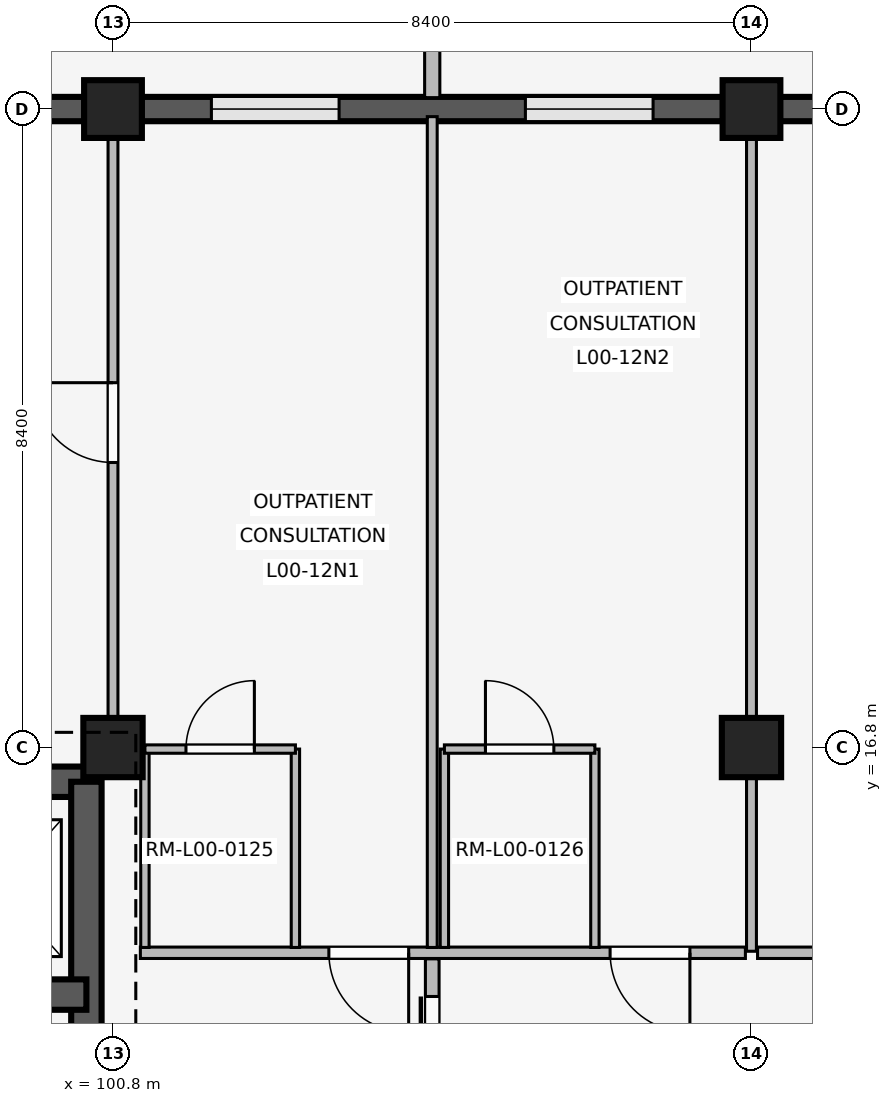
"""IFC4 building model, lengths in metres.
Left out: names, types, materials, properties, quantities, classifications, styles, units other than length and angle.
Written with IfcOpenShell. Run it as: python <this file> out.ifc"""

import sys

from ifc_helpers import new_model, si_unit, direction, frame, frame_2d, origin, origin_2d, place, context, subcontext, project, spatial, rectangle, extrude, element, fill, save


model = new_model("IFC4")
c1 = context("Model", 3, precision=1e-05, world=origin(), true_north=direction((0.0, 1.0)))
c2 = subcontext(c1, "Body", "Model", "MODEL_VIEW")
j1 = project(units=[si_unit("LENGTHUNIT", "METRE"), si_unit("PLANEANGLEUNIT", "RADIAN")], contexts=[c1])
p1 = place(None, origin())
s1 = spatial("IfcSite", under=j1, at=p1, CompositionType="ELEMENT")
p2 = place(p1, origin())
s2 = spatial("IfcBuilding", under=s1, at=p2, CompositionType="ELEMENT")
p3 = place(p2, origin())
s3 = spatial("IfcBuildingStorey", under=s2, at=p3, CompositionType="ELEMENT", Elevation=0.0)
p4 = place(p3, frame((100.8, 16.8, 0.0), z_axis=(0.0, 0.0, 1.0), x_axis=(1.0, 0.0, 0.0)))
e1 = element("IfcColumn", 1, at=p4, inside=s3, PredefinedType="COLUMN", context=c2, shape_type="SweptSolid", body=[
    extrude(rectangle(XDim=0.78, YDim=0.78, at=origin_2d()), origin(), (0.0, 0.0, 1.0), 4.8),
])
p5 = place(p3, frame((100.8, 25.2, 0.0), z_axis=(0.0, 0.0, 1.0), x_axis=(1.0, 0.0, 0.0)))
e2 = element("IfcColumn", 2, at=p5, inside=s3, PredefinedType="COLUMN", context=c2, shape_type="SweptSolid", body=[
    extrude(rectangle(XDim=0.76, YDim=0.76, at=origin_2d()), origin(), (0.0, 0.0, 1.0), 4.8),
])
p6 = place(p3, frame((109.2, 16.8, 0.0), z_axis=(0.0, 0.0, 1.0), x_axis=(1.0, 0.0, 0.0)))
e3 = element("IfcColumn", 3, at=p6, inside=s3, PredefinedType="COLUMN", context=c2, shape_type="SweptSolid", body=[
    extrude(rectangle(XDim=0.78, YDim=0.78, at=origin_2d()), origin(), (0.0, 0.0, 1.0), 4.8),
])
p7 = place(p3, frame((109.2, 25.2, 0.0), z_axis=(0.0, 0.0, 1.0), x_axis=(1.0, 0.0, 0.0)))
e4 = element("IfcColumn", 4, at=p7, inside=s3, PredefinedType="COLUMN", context=c2, shape_type="SweptSolid", body=[
    extrude(rectangle(XDim=0.76, YDim=0.76, at=origin_2d()), origin(), (0.0, 0.0, 1.0), 4.8),
])
p8 = place(p3, frame((92.775, 25.2, 0.0), z_axis=(0.0, 0.0, 1.0), x_axis=(1.0, 0.0, 0.0)))
e5 = element("IfcWall", 5, at=p8, inside=s3, PredefinedType="SOLIDWALL", context=c2, shape_type="SweptSolid", body=[
    extrude(rectangle(XDim=7.65, YDim=0.32, at=frame_2d((3.825, 0.0))), origin(), (0.0, 0.0, 1.0), 3.82),
])
p9 = place(p8, frame((0.99, 0.0, 0.85)))
e6 = element("IfcOpeningElement", 6, at=p9, cuts=e5, PredefinedType="OPENING", context=c2, shape_type="SweptSolid", body=[
    extrude(rectangle(XDim=1.54, YDim=1.85, at=frame_2d((0.77, 0.925))), frame((0.0, 0.17, 0.0), z_axis=(0.0, -1.0, 0.0), x_axis=(1.0, 0.0, 0.0)), (0.0, 0.0, 1.0), 0.34),
])
p10 = place(p8, frame((5.121, 0.0, 0.85)))
e7 = element("IfcOpeningElement", 7, at=p10, cuts=e5, PredefinedType="OPENING", context=c2, shape_type="SweptSolid", body=[
    extrude(rectangle(XDim=1.54, YDim=1.85, at=frame_2d((0.77, 0.925))), frame((0.0, 0.17, 0.0), z_axis=(0.0, -1.0, 0.0), x_axis=(1.0, 0.0, 0.0)), (0.0, 0.0, 1.0), 0.34),
])
p11 = place(p3, frame((101.175, 25.2, 0.0), z_axis=(0.0, 0.0, 1.0), x_axis=(1.0, 0.0, 0.0)))
e8 = element("IfcWall", 8, at=p11, inside=s3, PredefinedType="SOLIDWALL", context=c2, shape_type="SweptSolid", body=[
    extrude(rectangle(XDim=7.65, YDim=0.32, at=frame_2d((3.825, 0.0))), origin(), (0.0, 0.0, 1.0), 3.82),
])
p12 = place(p11, frame((0.919, 0.0, 0.85)))
e9 = element("IfcOpeningElement", 9, at=p12, cuts=e8, PredefinedType="OPENING", context=c2, shape_type="SweptSolid", body=[
    extrude(rectangle(XDim=1.68, YDim=2.05, at=frame_2d((0.84, 1.025))), frame((0.0, 0.17, 0.0), z_axis=(0.0, -1.0, 0.0), x_axis=(1.0, 0.0, 0.0)), (0.0, 0.0, 1.0), 0.34),
])
p13 = place(p11, frame((5.051, 0.0, 0.85)))
e10 = element("IfcOpeningElement", 10, at=p13, cuts=e8, PredefinedType="OPENING", context=c2, shape_type="SweptSolid", body=[
    extrude(rectangle(XDim=1.68, YDim=2.05, at=frame_2d((0.84, 1.025))), frame((0.0, 0.17, 0.0), z_axis=(0.0, -1.0, 0.0), x_axis=(1.0, 0.0, 0.0)), (0.0, 0.0, 1.0), 0.34),
])
p14 = place(p3, frame((105.0, 25.35, 0.0), z_axis=(0.0, 0.0, 1.0), x_axis=(0.0, 1.0, 0.0)))
e11 = element("IfcWall", 11, at=p14, inside=s3, PredefinedType="ELEMENTEDWALL", context=c2, shape_type="SweptSolid", body=[
    extrude(rectangle(XDim=0.85, YDim=0.2, at=frame_2d((0.425, 0.0))), origin(), (0.0, 0.0, 1.0), 3.8),
])
p15 = place(p3, frame((109.575, 25.2, 0.0), z_axis=(0.0, 0.0, 1.0), x_axis=(1.0, 0.0, 0.0)))
e12 = element("IfcWall", 12, at=p15, inside=s3, PredefinedType="SOLIDWALL", context=c2, shape_type="SweptSolid", body=[
    extrude(rectangle(XDim=7.65, YDim=0.32, at=frame_2d((3.825, 0.0))), origin(), (0.0, 0.0, 1.0), 3.82),
])
p16 = place(p15, frame((1.07, 0.0, 0.85)))
e13 = element("IfcOpeningElement", 13, at=p16, cuts=e12, PredefinedType="OPENING", context=c2, shape_type="SweptSolid", body=[
    extrude(rectangle(XDim=1.38, YDim=1.5, at=frame_2d((0.69, 0.75))), frame((0.0, 0.17, 0.0), z_axis=(0.0, -1.0, 0.0), x_axis=(1.0, 0.0, 0.0)), (0.0, 0.0, 1.0), 0.34),
])
p17 = place(p15, frame((5.2, 0.0, 0.85)))
e14 = element("IfcOpeningElement", 14, at=p17, cuts=e12, PredefinedType="OPENING", context=c2, shape_type="SweptSolid", body=[
    extrude(rectangle(XDim=1.38, YDim=1.5, at=frame_2d((0.69, 0.75))), frame((0.0, 0.17, 0.0), z_axis=(0.0, -1.0, 0.0), x_axis=(1.0, 0.0, 0.0)), (0.0, 0.0, 1.0), 0.34),
])
p18 = place(p3, frame((92.95, 16.35, 0.0), z_axis=(0.0, 0.0, 1.0), x_axis=(1.0, 0.0, 0.0)))
e15 = element("IfcWall", 15, at=p18, inside=s3, PredefinedType="SHEAR", context=c2, shape_type="SweptSolid", body=[
    extrude(rectangle(XDim=7.5, YDim=0.4, at=frame_2d((3.75, 0.0))), origin(), (0.0, 0.0, 1.0), 4.52),
])
p19 = place(p3, frame((100.45, 8.8, 0.0), z_axis=(0.0, 0.0, 1.0), x_axis=(0.0, 1.0, 0.0)))
e16 = element("IfcWall", 16, at=p19, inside=s3, PredefinedType="SHEAR", context=c2, shape_type="SweptSolid", body=[
    extrude(rectangle(XDim=7.55, YDim=0.4, at=frame_2d((3.775, 0.0))), origin(), (0.0, 0.0, 1.0), 4.52),
])
p20 = place(p19, frame((2.4, 0.0, 0.0)))
e17 = element("IfcOpeningElement", 17, at=p20, cuts=e16, PredefinedType="OPENING", context=c2, shape_type="SweptSolid", body=[
    extrude(rectangle(XDim=1.2, YDim=2.2, at=frame_2d((0.6, 1.1))), frame((0.0, 0.21, 0.0), z_axis=(0.0, -1.0, 0.0), x_axis=(1.0, 0.0, 0.0)), (0.0, 0.0, 1.0), 0.42),
])
p21 = place(p3, frame((96.65, 13.55, 0.0), z_axis=(0.0, 0.0, 1.0), x_axis=(1.0, 0.0, 0.0)))
e18 = element("IfcWall", 18, at=p21, inside=s3, PredefinedType="SHEAR", context=c2, shape_type="SweptSolid", body=[
    extrude(rectangle(XDim=3.8, YDim=0.4, at=frame_2d((1.9, 0.0))), origin(), (0.0, 0.0, 1.0), 4.52),
])
p22 = place(p21, frame((0.32, 0.0, 0.0)))
e19 = element("IfcOpeningElement", 19, at=p22, cuts=e18, PredefinedType="OPENING", context=c2, shape_type="SweptSolid", body=[
    extrude(rectangle(XDim=1.4, YDim=2.25, at=frame_2d((0.7, 1.125))), frame((0.0, 0.21, 0.0), z_axis=(0.0, -1.0, 0.0), x_axis=(1.0, 0.0, 0.0)), (0.0, 0.0, 1.0), 0.42),
])
p23 = place(p21, frame((2.04, 0.0, 0.0)))
e20 = element("IfcOpeningElement", 20, at=p23, cuts=e18, PredefinedType="OPENING", context=c2, shape_type="SweptSolid", body=[
    extrude(rectangle(XDim=1.1, YDim=2.15, at=frame_2d((0.55, 1.075))), frame((0.0, 0.21, 0.0), z_axis=(0.0, -1.0, 0.0), x_axis=(1.0, 0.0, 0.0)), (0.0, 0.0, 1.0), 0.42),
])
p24 = place(p3, frame((100.8, 17.15, 0.0), z_axis=(0.0, 0.0, 1.0), x_axis=(0.0, 1.0, 0.0)))
e21 = element("IfcWall", 21, at=p24, inside=s3, PredefinedType="PARTITIONING", context=c2, shape_type="SweptSolid", body=[
    extrude(rectangle(XDim=7.91, YDim=0.13, at=frame_2d((3.955, 0.0))), origin(), (0.0, 0.0, 1.0), 3.8),
])
p25 = place(p24, frame((3.4, 0.0, 0.0)))
e22 = element("IfcOpeningElement", 22, at=p25, cuts=e21, PredefinedType="OPENING", context=c2, shape_type="SweptSolid", body=[
    extrude(rectangle(XDim=1.05, YDim=2.2, at=frame_2d((0.525, 1.1))), frame((0.0, 0.075, 0.0), z_axis=(0.0, -1.0, 0.0), x_axis=(1.0, 0.0, 0.0)), (0.0, 0.0, 1.0), 0.15),
])
p26 = place(p3, frame((109.12, 14.1, 0.0), z_axis=(0.0, 0.0, 1.0), x_axis=(-1.0, 0.0, 0.0)))
e23 = element("IfcWall", 23, at=p26, inside=s3, PredefinedType="PARTITIONING", context=c2, shape_type="SweptSolid", body=[
    extrude(rectangle(XDim=7.96, YDim=0.15, at=frame_2d((3.98, 0.0))), origin(), (0.0, 0.0, 1.0), 3.8),
])
p27 = place(p26, frame((0.73, 0.0, 0.0)))
e24 = element("IfcOpeningElement", 24, at=p27, cuts=e23, PredefinedType="OPENING", context=c2, shape_type="SweptSolid", body=[
    extrude(rectangle(XDim=1.05, YDim=2.2, at=frame_2d((0.525, 1.1))), frame((0.0, 0.085, 0.0), z_axis=(0.0, -1.0, 0.0), x_axis=(1.0, 0.0, 0.0)), (0.0, 0.0, 1.0), 0.17),
])
p28 = place(p26, frame((4.43, 0.0, 0.0)))
e25 = element("IfcOpeningElement", 25, at=p28, cuts=e23, PredefinedType="OPENING", context=c2, shape_type="SweptSolid", body=[
    extrude(rectangle(XDim=1.05, YDim=2.2, at=frame_2d((0.525, 1.1))), frame((0.0, 0.085, 0.0), z_axis=(0.0, -1.0, 0.0), x_axis=(1.0, 0.0, 0.0)), (0.0, 0.0, 1.0), 0.17),
])
p29 = place(p3, frame((105.0, 14.17, 0.0), z_axis=(0.0, 0.0, 1.0), x_axis=(0.0, 1.0, 0.0)))
e26 = element("IfcWall", 26, at=p29, inside=s3, PredefinedType="PARTITIONING", context=c2, shape_type="SweptSolid", body=[
    extrude(rectangle(XDim=10.93, YDim=0.13, at=frame_2d((5.465, 0.0))), origin(), (0.0, 0.0, 1.0), 3.8),
])
for number, where, z_axis, x_axis in (
    (27, (101.22, 14.17, 0.0), (0.0, 0.0, 1.0), (0.0, 1.0, 0.0)),
    (28, (103.2, 14.17, 0.0), (0.0, 0.0, 1.0), (0.0, 1.0, 0.0)),
):
    element("IfcWall", number, at=place(p3, frame(where, z_axis=z_axis, x_axis=x_axis)), inside=s3, PredefinedType="PARTITIONING", context=c2, shape_type="SweptSolid", body=[
        extrude(rectangle(XDim=2.61, YDim=0.11, at=frame_2d((1.305, 0.0))), origin(), (0.0, 0.0, 1.0), 3.8),
    ])
p30 = place(p3, frame((101.22, 16.78, 0.0), z_axis=(0.0, 0.0, 1.0), x_axis=(1.0, 0.0, 0.0)))
e29 = element("IfcWall", 29, at=p30, inside=s3, PredefinedType="PARTITIONING", context=c2, shape_type="SweptSolid", body=[
    extrude(rectangle(XDim=1.98, YDim=0.11, at=frame_2d((0.99, 0.0))), origin(), (0.0, 0.0, 1.0), 3.8),
])
p31 = place(p30, frame((0.54, 0.0, 0.0)))
e30 = element("IfcOpeningElement", 30, at=p31, cuts=e29, PredefinedType="OPENING", context=c2, shape_type="SweptSolid", body=[
    extrude(rectangle(XDim=0.9, YDim=2.1, at=frame_2d((0.45, 1.05))), frame((0.0, 0.065, 0.0), z_axis=(0.0, -1.0, 0.0), x_axis=(1.0, 0.0, 0.0)), (0.0, 0.0, 1.0), 0.13),
])
for number, where, z_axis, x_axis in (
    (31, (105.16, 14.17, 0.0), (0.0, 0.0, 1.0), (0.0, 1.0, 0.0)),
    (32, (107.14, 14.17, 0.0), (0.0, 0.0, 1.0), (0.0, 1.0, 0.0)),
):
    element("IfcWall", number, at=place(p3, frame(where, z_axis=z_axis, x_axis=x_axis)), inside=s3, PredefinedType="PARTITIONING", context=c2, shape_type="SweptSolid", body=[
        extrude(rectangle(XDim=2.61, YDim=0.11, at=frame_2d((1.305, 0.0))), origin(), (0.0, 0.0, 1.0), 3.8),
    ])
p32 = place(p3, frame((105.16, 16.78, 0.0), z_axis=(0.0, 0.0, 1.0), x_axis=(1.0, 0.0, 0.0)))
e33 = element("IfcWall", 33, at=p32, inside=s3, PredefinedType="PARTITIONING", context=c2, shape_type="SweptSolid", body=[
    extrude(rectangle(XDim=1.98, YDim=0.11, at=frame_2d((0.99, 0.0))), origin(), (0.0, 0.0, 1.0), 3.8),
])
p33 = place(p32, frame((0.54, 0.0, 0.0)))
e34 = element("IfcOpeningElement", 34, at=p33, cuts=e33, PredefinedType="OPENING", context=c2, shape_type="SweptSolid", body=[
    extrude(rectangle(XDim=0.9, YDim=2.1, at=frame_2d((0.45, 1.05))), frame((0.0, 0.065, 0.0), z_axis=(0.0, -1.0, 0.0), x_axis=(1.0, 0.0, 0.0)), (0.0, 0.0, 1.0), 0.13),
])
p34 = place(p3, frame((105.0, 11.18, 0.0), z_axis=(0.0, 0.0, 1.0), x_axis=(0.0, 1.0, 0.0)))
e35 = element("IfcWall", 35, at=p34, inside=s3, PredefinedType="PARTITIONING", context=c2, shape_type="SweptSolid", body=[
    extrude(rectangle(XDim=2.84, YDim=0.18, at=frame_2d((1.42, 0.0))), origin(), (0.0, 0.0, 1.0), 3.8),
])
p35 = place(p34, frame((0.495, 0.0, 0.0)))
e36 = element("IfcOpeningElement", 36, at=p35, cuts=e35, PredefinedType="OPENING", context=c2, shape_type="SweptSolid", body=[
    extrude(rectangle(XDim=1.85, YDim=2.3, at=frame_2d((0.925, 1.15))), frame((0.0, 0.1, 0.0), z_axis=(0.0, -1.0, 0.0), x_axis=(1.0, 0.0, 0.0)), (0.0, 0.0, 1.0), 0.2),
])
p36 = place(p3, frame((109.2, 14.12, 0.0), z_axis=(0.0, 0.0, 1.0), x_axis=(0.0, 1.0, 0.0)))
e37 = element("IfcWall", 37, at=p36, inside=s3, PredefinedType="PARTITIONING", context=c2, shape_type="SweptSolid", body=[
    extrude(rectangle(XDim=10.94, YDim=0.13, at=frame_2d((5.47, 0.0))), origin(), (0.0, 0.0, 1.0), 3.8),
])
p37 = place(p3, frame((117.52, 14.1, 0.0), z_axis=(0.0, 0.0, 1.0), x_axis=(-1.0, 0.0, 0.0)))
e38 = element("IfcWall", 38, at=p37, inside=s3, PredefinedType="PARTITIONING", context=c2, shape_type="SweptSolid", body=[
    extrude(rectangle(XDim=8.24, YDim=0.15, at=frame_2d((4.12, 0.0))), origin(), (0.0, 0.0, 1.0), 3.8),
])
p38 = place(p37, frame((3.545, 0.0, 0.0)))
e39 = element("IfcOpeningElement", 39, at=p38, cuts=e38, PredefinedType="OPENING", context=c2, shape_type="SweptSolid", body=[
    extrude(rectangle(XDim=1.15, YDim=2.2, at=frame_2d((0.575, 1.1))), frame((0.0, 0.085, 0.0), z_axis=(0.0, -1.0, 0.0), x_axis=(1.0, 0.0, 0.0)), (0.0, 0.0, 1.0), 0.17),
])
p39 = place(p12, origin())
e40 = element("IfcWindow", 40, at=p39, inside=s3, PartitioningType="SINGLE_PANEL", PredefinedType="WINDOW", context=c2, shape_type="SweptSolid", body=[
    extrude(rectangle(XDim=1.68, YDim=2.05, at=frame_2d((0.84, 1.025))), frame((0.0, 0.03, 0.0), z_axis=(0.0, -1.0, 0.0), x_axis=(1.0, 0.0, 0.0)), (0.0, 0.0, 1.0), 0.06),
])
fill(e9, e40)
p40 = place(p13, origin())
e41 = element("IfcWindow", 41, at=p40, inside=s3, PartitioningType="SINGLE_PANEL", PredefinedType="WINDOW", context=c2, shape_type="SweptSolid", body=[
    extrude(rectangle(XDim=1.68, YDim=2.05, at=frame_2d((0.84, 1.025))), frame((0.0, 0.03, 0.0), z_axis=(0.0, -1.0, 0.0), x_axis=(1.0, 0.0, 0.0)), (0.0, 0.0, 1.0), 0.06),
])
fill(e10, e41)
p41 = place(p25, origin())
e42 = element("IfcDoor", 42, at=p41, inside=s3, OperationType="SINGLE_SWING_RIGHT", PredefinedType="DOOR", context=c2, shape_type="SweptSolid", body=[
    extrude(rectangle(XDim=1.05, YDim=2.2, at=frame_2d((0.525, 1.1))), frame((0.0, 0.025, 0.0), z_axis=(0.0, -1.0, 0.0), x_axis=(1.0, 0.0, 0.0)), (0.0, 0.0, 1.0), 0.05),
])
fill(e22, e42)
p42 = place(p27, origin())
e43 = element("IfcDoor", 43, at=p42, inside=s3, OperationType="SINGLE_SWING_LEFT", PredefinedType="DOOR", context=c2, shape_type="SweptSolid", body=[
    extrude(rectangle(XDim=1.05, YDim=2.2, at=frame_2d((0.525, 1.1))), frame((0.0, 0.025, 0.0), z_axis=(0.0, -1.0, 0.0), x_axis=(1.0, 0.0, 0.0)), (0.0, 0.0, 1.0), 0.05),
])
fill(e24, e43)
p43 = place(p28, origin())
e44 = element("IfcDoor", 44, at=p43, inside=s3, OperationType="SINGLE_SWING_LEFT", PredefinedType="DOOR", context=c2, shape_type="SweptSolid", body=[
    extrude(rectangle(XDim=1.05, YDim=2.2, at=frame_2d((0.525, 1.1))), frame((0.0, 0.025, 0.0), z_axis=(0.0, -1.0, 0.0), x_axis=(1.0, 0.0, 0.0)), (0.0, 0.0, 1.0), 0.05),
])
fill(e25, e44)
p44 = place(p31, origin())
e45 = element("IfcDoor", 45, at=p44, inside=s3, OperationType="SINGLE_SWING_RIGHT", PredefinedType="DOOR", context=c2, shape_type="SweptSolid", body=[
    extrude(rectangle(XDim=0.9, YDim=2.1, at=frame_2d((0.45, 1.05))), frame((0.0, 0.025, 0.0), z_axis=(0.0, -1.0, 0.0), x_axis=(1.0, 0.0, 0.0)), (0.0, 0.0, 1.0), 0.05),
])
fill(e30, e45)
p45 = place(p33, origin())
e46 = element("IfcDoor", 46, at=p45, inside=s3, OperationType="SINGLE_SWING_LEFT", PredefinedType="DOOR", context=c2, shape_type="SweptSolid", body=[
    extrude(rectangle(XDim=0.9, YDim=2.1, at=frame_2d((0.45, 1.05))), frame((0.0, 0.025, 0.0), z_axis=(0.0, -1.0, 0.0), x_axis=(1.0, 0.0, 0.0)), (0.0, 0.0, 1.0), 0.05),
])
fill(e34, e46)
p46 = place(p35, origin())
e47 = element("IfcDoor", 47, at=p46, inside=s3, OperationType="SLIDING_TO_LEFT", PredefinedType="DOOR", context=c2, shape_type="SweptSolid", body=[
    extrude(rectangle(XDim=1.85, YDim=2.3, at=frame_2d((0.925, 1.15))), frame((0.0, 0.025, 0.0), z_axis=(0.0, -1.0, 0.0), x_axis=(1.0, 0.0, 0.0)), (0.0, 0.0, 1.0), 0.05),
])
fill(e36, e47)
save(model, sys.argv[1])
